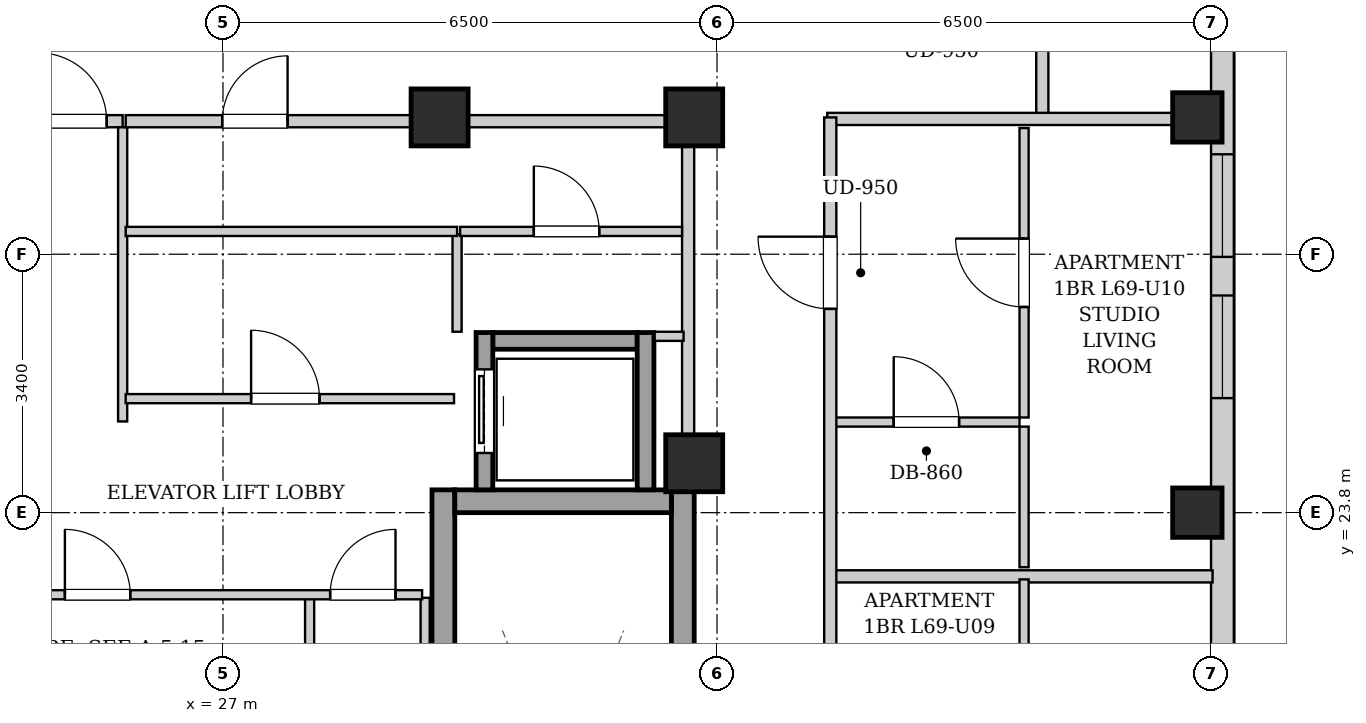
"""IFC4 building model, lengths in metres.
Left out: names, types, materials, properties, quantities, classifications, styles, units other than length and angle.
Written with IfcOpenShell. Run it as: python <this file> out.ifc"""

import sys

from ifc_helpers import new_model, si_unit, direction, frame, frame_2d, origin, origin_2d, place, context, subcontext, project, spatial, rectangle, extrude, element, fill, save


model = new_model("IFC4")
c1 = context("Model", 3, precision=1e-05, world=origin(), true_north=direction((0.0, 1.0)))
c2 = subcontext(c1, "Body", "Model", "MODEL_VIEW")
j1 = project(units=[si_unit("LENGTHUNIT", "METRE"), si_unit("PLANEANGLEUNIT", "RADIAN")], contexts=[c1])
p1 = place(None, origin())
s1 = spatial("IfcSite", under=j1, at=p1, CompositionType="ELEMENT")
p2 = place(p1, origin())
s2 = spatial("IfcBuilding", under=s1, at=p2, CompositionType="ELEMENT")
p3 = place(p2, frame((0.0, 0.0, 237.7)))
s3 = spatial("IfcBuildingStorey", under=s2, at=p3, CompositionType="ELEMENT", Elevation=237.7)
for number, where, z_axis, x_axis in (
    (1, (39.82, 23.8, 0.0), (0.0, 0.0, 1.0), (1.0, 0.0, 0.0)),
    (2, (39.82, 29.0, 0.0), (0.0, 0.0, 1.0), (1.0, 0.0, 0.0)),
):
    element("IfcColumn", number, at=place(p3, frame(where, z_axis=z_axis, x_axis=x_axis)), inside=s3, PredefinedType="COLUMN", context=c2, shape_type="SweptSolid", body=[
        extrude(rectangle(XDim=0.65, YDim=0.65, at=origin_2d()), origin(), (0.0, 0.0, 1.0), 3.4),
    ])
for number, where, z_axis, x_axis in (
    (3, (29.85, 29.0, 0.0), (0.0, 0.0, 1.0), (1.0, 0.0, 0.0)),
    (4, (33.2, 29.0, 0.0), (0.0, 0.0, 1.0), (1.0, 0.0, 0.0)),
    (5, (33.2, 24.45, 0.0), (0.0, 0.0, 1.0), (1.0, 0.0, 0.0)),
):
    element("IfcColumn", number, at=place(p3, frame(where, z_axis=z_axis, x_axis=x_axis)), inside=s3, PredefinedType="COLUMN", context=c2, shape_type="SweptSolid", body=[
        extrude(rectangle(XDim=0.75, YDim=0.75, at=origin_2d()), origin(), (0.0, 0.0, 1.0), 3.4),
    ])
p4 = place(p3, frame((40.15, 37.7, 0.0), z_axis=(0.0, 0.0, 1.0), x_axis=(0.0, -1.0, 0.0)))
e6 = element("IfcWall", 6, at=p4, inside=s3, PredefinedType="SOLIDWALL", context=c2, shape_type="SweptSolid", body=[
    extrude(rectangle(XDim=31.4, YDim=0.3, at=frame_2d((15.7, 0.0))), origin(), (0.0, 0.0, 1.0), 3.14),
])
p5 = place(p4, frame((28.546, 0.0, 0.55)))
e7 = element("IfcOpeningElement", 7, at=p5, cuts=e6, PredefinedType="OPENING", context=c2, shape_type="SweptSolid", body=[
    extrude(rectangle(XDim=1.35, YDim=1.2, at=frame_2d((0.675, 0.6))), frame((0.0, 0.16, 0.0), z_axis=(0.0, -1.0, 0.0), x_axis=(1.0, 0.0, 0.0)), (0.0, 0.0, 1.0), 0.32),
])
p6 = place(p4, frame((1.504, 0.0, 0.55)))
e8 = element("IfcOpeningElement", 8, at=p6, cuts=e6, PredefinedType="OPENING", context=c2, shape_type="SweptSolid", body=[
    extrude(rectangle(XDim=1.35, YDim=1.2, at=frame_2d((0.675, 0.6))), frame((0.0, 0.16, 0.0), z_axis=(0.0, -1.0, 0.0), x_axis=(1.0, 0.0, 0.0)), (0.0, 0.0, 1.0), 0.32),
])
p7 = place(p4, frame((18.2, 0.0, 0.55)))
e9 = element("IfcOpeningElement", 9, at=p7, cuts=e6, PredefinedType="OPENING", context=c2, shape_type="SweptSolid", body=[
    extrude(rectangle(XDim=1.35, YDim=1.2, at=frame_2d((0.675, 0.6))), frame((0.0, 0.16, 0.0), z_axis=(0.0, -1.0, 0.0), x_axis=(1.0, 0.0, 0.0)), (0.0, 0.0, 1.0), 0.32),
])
p8 = place(p4, frame((19.81, 0.0, 0.55)))
e10 = element("IfcOpeningElement", 10, at=p8, cuts=e6, PredefinedType="OPENING", context=c2, shape_type="SweptSolid", body=[
    extrude(rectangle(XDim=1.35, YDim=1.2, at=frame_2d((0.675, 0.6))), frame((0.0, 0.16, 0.0), z_axis=(0.0, -1.0, 0.0), x_axis=(1.0, 0.0, 0.0)), (0.0, 0.0, 1.0), 0.32),
])
p9 = place(p4, frame((11.043, 0.0, 0.55)))
e11 = element("IfcOpeningElement", 11, at=p9, cuts=e6, PredefinedType="OPENING", context=c2, shape_type="SweptSolid", body=[
    extrude(rectangle(XDim=1.35, YDim=1.2, at=frame_2d((0.675, 0.6))), frame((0.0, 0.16, 0.0), z_axis=(0.0, -1.0, 0.0), x_axis=(1.0, 0.0, 0.0)), (0.0, 0.0, 1.0), 0.32),
])
p10 = place(p4, frame((9.185, 0.0, 0.55)))
e12 = element("IfcOpeningElement", 12, at=p10, cuts=e6, PredefinedType="OPENING", context=c2, shape_type="SweptSolid", body=[
    extrude(rectangle(XDim=1.35, YDim=1.2, at=frame_2d((0.675, 0.6))), frame((0.0, 0.16, 0.0), z_axis=(0.0, -1.0, 0.0), x_axis=(1.0, 0.0, 0.0)), (0.0, 0.0, 1.0), 0.32),
])
for number, where, z_axis, x_axis in (
    (13, (29.9, 15.1, 0.0), (0.0, 0.0, 1.0), (0.0, 1.0, 0.0)),
    (14, (33.05, 15.1, 0.0), (0.0, 0.0, 1.0), (0.0, 1.0, 0.0)),
):
    element("IfcWall", number, at=place(p3, frame(where, z_axis=z_axis, x_axis=x_axis)), inside=s3, PredefinedType="SHEAR", context=c2, shape_type="SweptSolid", body=[
        extrude(rectangle(XDim=9.0, YDim=0.3, at=frame_2d((4.5, 0.0))), origin(), (0.0, 0.0, 1.0), 3.14),
    ])
p11 = place(p3, frame((30.05, 23.95, 0.0), z_axis=(0.0, 0.0, 1.0), x_axis=(1.0, 0.0, 0.0)))
e15 = element("IfcWall", 15, at=p11, inside=s3, PredefinedType="SHEAR", context=c2, shape_type="SweptSolid", body=[
    extrude(rectangle(XDim=2.85, YDim=0.3, at=frame_2d((1.425, 0.0))), origin(), (0.0, 0.0, 1.0), 3.14),
])
p12 = place(p3, frame((30.55, 26.06, 0.0), z_axis=(0.0, 0.0, 1.0), x_axis=(1.0, 0.0, 0.0)))
e16 = element("IfcWall", 16, at=p12, inside=s3, PredefinedType="SHEAR", context=c2, shape_type="SweptSolid", body=[
    extrude(rectangle(XDim=1.9, YDim=0.22, at=frame_2d((0.95, 0.0))), origin(), (0.0, 0.0, 1.0), 3.14),
])
p13 = place(p3, frame((30.44, 24.1, 0.0), z_axis=(0.0, 0.0, 1.0), x_axis=(0.0, 1.0, 0.0)))
e17 = element("IfcWall", 17, at=p13, inside=s3, PredefinedType="SHEAR", context=c2, shape_type="SweptSolid", body=[
    extrude(rectangle(XDim=2.07, YDim=0.22, at=frame_2d((1.035, 0.0))), origin(), (0.0, 0.0, 1.0), 3.14),
])
p14 = place(p13, frame((0.485, 0.0, 0.0)))
e18 = element("IfcOpeningElement", 18, at=p14, cuts=e17, PredefinedType="OPENING", context=c2, shape_type="SweptSolid", body=[
    extrude(rectangle(XDim=1.1, YDim=2.15, at=frame_2d((0.55, 1.075))), frame((0.0, 0.12, 0.0), z_axis=(0.0, -1.0, 0.0), x_axis=(1.0, 0.0, 0.0)), (0.0, 0.0, 1.0), 0.24),
])
p15 = place(p3, frame((32.56, 24.1, 0.0), z_axis=(0.0, 0.0, 1.0), x_axis=(0.0, 1.0, 0.0)))
e19 = element("IfcWall", 19, at=p15, inside=s3, PredefinedType="SHEAR", context=c2, shape_type="SweptSolid", body=[
    extrude(rectangle(XDim=2.07, YDim=0.22, at=frame_2d((1.035, 0.0))), origin(), (0.0, 0.0, 1.0), 3.14),
])
p16 = place(p3, frame((33.12, 24.12, 0.0), z_axis=(0.0, 0.0, 1.0), x_axis=(0.0, 1.0, 0.0)))
e20 = element("IfcWall", 20, at=p16, inside=s3, PredefinedType="PARTITIONING", context=c2, shape_type="SweptSolid", body=[
    extrude(rectangle(XDim=4.76, YDim=0.16, at=frame_2d((2.38, 0.0))), origin(), (0.0, 0.0, 1.0), 2.475),
])
p17 = place(p3, frame((24.36, 28.95, 0.0), z_axis=(0.0, 0.0, 1.0), x_axis=(1.0, 0.0, 0.0)))
e21 = element("IfcWall", 21, at=p17, inside=s3, PredefinedType="PARTITIONING", context=c2, shape_type="SweptSolid", body=[
    extrude(rectangle(XDim=1.32, YDim=0.16, at=frame_2d((0.66, 0.0))), origin(), (0.0, 0.0, 1.0), 2.668),
])
p18 = place(p17, frame((0.21, 0.0, 0.0)))
e22 = element("IfcOpeningElement", 22, at=p18, cuts=e21, PredefinedType="OPENING", context=c2, shape_type="SweptSolid", body=[
    extrude(rectangle(XDim=0.9, YDim=2.05, at=frame_2d((0.45, 1.025))), frame((0.0, 0.09, 0.0), z_axis=(0.0, -1.0, 0.0), x_axis=(1.0, 0.0, 0.0)), (0.0, 0.0, 1.0), 0.18),
])
p19 = place(p3, frame((25.68, 25.0, 0.0), z_axis=(0.0, 0.0, 1.0), x_axis=(0.0, 1.0, 0.0)))
e23 = element("IfcWall", 23, at=p19, inside=s3, PredefinedType="PARTITIONING", context=c2, shape_type="SweptSolid", body=[
    extrude(rectangle(XDim=3.87, YDim=0.12, at=frame_2d((1.935, 0.0))), origin(), (0.0, 0.0, 1.0), 3.14),
])
p20 = place(p3, frame((30.08, 26.18, 0.0), z_axis=(0.0, 0.0, 1.0), x_axis=(0.0, 1.0, 0.0)))
e24 = element("IfcWall", 24, at=p20, inside=s3, PredefinedType="PARTITIONING", context=c2, shape_type="SweptSolid", body=[
    extrude(rectangle(XDim=1.28, YDim=0.12, at=frame_2d((0.64, 0.0))), origin(), (0.0, 0.0, 1.0), 3.14),
])
p21 = place(p3, frame((32.68, 26.12, 0.0), z_axis=(0.0, 0.0, 1.0), x_axis=(1.0, 0.0, 0.0)))
e25 = element("IfcWall", 25, at=p21, inside=s3, PredefinedType="PARTITIONING", context=c2, shape_type="SweptSolid", body=[
    extrude(rectangle(XDim=0.38, YDim=0.12, at=frame_2d((0.19, 0.0))), origin(), (0.0, 0.0, 1.0), 3.14),
])
p22 = place(p3, frame((30.12, 27.5, 0.0), z_axis=(0.0, 0.0, 1.0), x_axis=(1.0, 0.0, 0.0)))
e26 = element("IfcWall", 26, at=p22, inside=s3, PredefinedType="PARTITIONING", context=c2, shape_type="SweptSolid", body=[
    extrude(rectangle(XDim=2.92, YDim=0.12, at=frame_2d((1.46, 0.0))), origin(), (0.0, 0.0, 1.0), 3.14),
])
p23 = place(p22, frame((0.97, 0.0, 0.0)))
e27 = element("IfcOpeningElement", 27, at=p23, cuts=e26, PredefinedType="OPENING", context=c2, shape_type="SweptSolid", body=[
    extrude(rectangle(XDim=0.86, YDim=2.05, at=frame_2d((0.43, 1.025))), frame((0.0, 0.07, 0.0), z_axis=(0.0, -1.0, 0.0), x_axis=(1.0, 0.0, 0.0)), (0.0, 0.0, 1.0), 0.14),
])
p24 = place(p3, frame((25.72, 27.5, 0.0), z_axis=(0.0, 0.0, 1.0), x_axis=(1.0, 0.0, 0.0)))
e28 = element("IfcWall", 28, at=p24, inside=s3, PredefinedType="PARTITIONING", context=c2, shape_type="SweptSolid", body=[
    extrude(rectangle(XDim=4.36, YDim=0.12, at=frame_2d((2.18, 0.0))), origin(), (0.0, 0.0, 1.0), 3.14),
])
p25 = place(p3, frame((25.72, 25.3, 0.0), z_axis=(0.0, 0.0, 1.0), x_axis=(1.0, 0.0, 0.0)))
e29 = element("IfcWall", 29, at=p25, inside=s3, PredefinedType="PARTITIONING", context=c2, shape_type="SweptSolid", body=[
    extrude(rectangle(XDim=4.32, YDim=0.12, at=frame_2d((2.16, 0.0))), origin(), (0.0, 0.0, 1.0), 3.14),
])
p26 = place(p25, frame((1.65, 0.0, 0.0)))
e30 = element("IfcOpeningElement", 30, at=p26, cuts=e29, PredefinedType="OPENING", context=c2, shape_type="SweptSolid", body=[
    extrude(rectangle(XDim=0.9, YDim=2.05, at=frame_2d((0.45, 1.025))), frame((0.0, 0.07, 0.0), z_axis=(0.0, -1.0, 0.0), x_axis=(1.0, 0.0, 0.0)), (0.0, 0.0, 1.0), 0.14),
])
p27 = place(p3, frame((25.72, 28.95, 0.0), z_axis=(0.0, 0.0, 1.0), x_axis=(1.0, 0.0, 0.0)))
e31 = element("IfcWall", 31, at=p27, inside=s3, PredefinedType="PARTITIONING", context=c2, shape_type="SweptSolid", body=[
    extrude(rectangle(XDim=7.32, YDim=0.16, at=frame_2d((3.66, 0.0))), origin(), (0.0, 0.0, 1.0), 2.668),
])
p28 = place(p27, frame((1.27, 0.0, 0.0)))
e32 = element("IfcOpeningElement", 32, at=p28, cuts=e31, PredefinedType="OPENING", context=c2, shape_type="SweptSolid", body=[
    extrude(rectangle(XDim=0.86, YDim=2.05, at=frame_2d((0.43, 1.025))), frame((0.0, 0.09, 0.0), z_axis=(0.0, -1.0, 0.0), x_axis=(1.0, 0.0, 0.0)), (0.0, 0.0, 1.0), 0.18),
])
p29 = place(p3, frame((29.66, 20.62, 0.0), z_axis=(0.0, 0.0, 1.0), x_axis=(0.0, 1.0, 0.0)))
e33 = element("IfcWall", 33, at=p29, inside=s3, PredefinedType="PARTITIONING", context=c2, shape_type="SweptSolid", body=[
    extrude(rectangle(XDim=2.06, YDim=0.12, at=frame_2d((1.03, 0.0))), origin(), (0.0, 0.0, 1.0), 3.14),
])
p30 = place(p3, frame((28.14, 21.65, 0.0), z_axis=(0.0, 0.0, 1.0), x_axis=(0.0, 1.0, 0.0)))
e34 = element("IfcWall", 34, at=p30, inside=s3, PredefinedType="PARTITIONING", context=c2, shape_type="SweptSolid", body=[
    extrude(rectangle(XDim=1.03, YDim=0.12, at=frame_2d((0.515, 0.0))), origin(), (0.0, 0.0, 1.0), 3.14),
])
p31 = place(p3, frame((22.35, 22.72, 0.0), z_axis=(0.0, 0.0, 1.0), x_axis=(1.0, 0.0, 0.0)))
e35 = element("IfcWall", 35, at=p31, inside=s3, PredefinedType="PARTITIONING", context=c2, shape_type="SweptSolid", body=[
    extrude(rectangle(XDim=7.27, YDim=0.12, at=frame_2d((3.635, 0.0))), origin(), (0.0, 0.0, 1.0), 3.14),
])
p32 = place(p31, frame((2.57, 0.0, 0.0)))
e36 = element("IfcOpeningElement", 36, at=p32, cuts=e35, PredefinedType="OPENING", context=c2, shape_type="SweptSolid", body=[
    extrude(rectangle(XDim=0.86, YDim=2.05, at=frame_2d((0.43, 1.025))), frame((0.0, 0.07, 0.0), z_axis=(0.0, -1.0, 0.0), x_axis=(1.0, 0.0, 0.0)), (0.0, 0.0, 1.0), 0.14),
])
p33 = place(p31, frame((6.06, 0.0, 0.0)))
e37 = element("IfcOpeningElement", 37, at=p33, cuts=e35, PredefinedType="OPENING", context=c2, shape_type="SweptSolid", body=[
    extrude(rectangle(XDim=0.86, YDim=2.05, at=frame_2d((0.43, 1.025))), frame((0.0, 0.07, 0.0), z_axis=(0.0, -1.0, 0.0), x_axis=(1.0, 0.0, 0.0)), (0.0, 0.0, 1.0), 0.14),
])
p34 = place(p3, frame((37.78, 28.98, 0.0), z_axis=(0.0, 0.0, 1.0), x_axis=(0.0, 1.0, 0.0)))
e38 = element("IfcWall", 38, at=p34, inside=s3, PredefinedType="PARTITIONING", context=c2, shape_type="SweptSolid", body=[
    extrude(rectangle(XDim=1.58, YDim=0.16, at=frame_2d((0.79, 0.0))), origin(), (0.0, 0.0, 1.0), 3.14),
])
p35 = place(p3, frame((34.95, 28.98, 0.0), z_axis=(0.0, 0.0, 1.0), x_axis=(1.0, 0.0, 0.0)))
e39 = element("IfcWall", 39, at=p35, inside=s3, PredefinedType="PARTITIONING", context=c2, shape_type="SweptSolid", body=[
    extrude(rectangle(XDim=5.07, YDim=0.16, at=frame_2d((2.535, 0.0))), origin(), (0.0, 0.0, 1.0), 2.668),
])
p36 = place(p3, frame((35.03, 22.962, 0.0), z_axis=(0.0, 0.0, 1.0), x_axis=(1.0, 0.0, 0.0)))
e40 = element("IfcWall", 40, at=p36, inside=s3, PredefinedType="PARTITIONING", context=c2, shape_type="SweptSolid", body=[
    extrude(rectangle(XDim=4.99, YDim=0.16, at=frame_2d((2.495, 0.0))), origin(), (0.0, 0.0, 1.0), 3.14),
])
p37 = place(p3, frame((37.54, 17.489, 0.0), z_axis=(0.0, 0.0, 1.0), x_axis=(0.0, 1.0, 0.0)))
e41 = element("IfcWall", 41, at=p37, inside=s3, PredefinedType="PARTITIONING", context=c2, shape_type="SweptSolid", body=[
    extrude(rectangle(XDim=5.433, YDim=0.12, at=frame_2d((2.717, 0.0))), origin(), (0.0, 0.0, 1.0), 3.14),
])
p38 = place(p37, frame((2.266, 0.0, 0.0)))
e42 = element("IfcOpeningElement", 42, at=p38, cuts=e41, PredefinedType="OPENING", context=c2, shape_type="SweptSolid", body=[
    extrude(rectangle(XDim=0.9, YDim=2.05, at=frame_2d((0.45, 1.025))), frame((0.0, 0.07, 0.0), z_axis=(0.0, -1.0, 0.0), x_axis=(1.0, 0.0, 0.0)), (0.0, 0.0, 1.0), 0.14),
])
p39 = place(p3, frame((35.03, 24.992, 0.0), z_axis=(0.0, 0.0, 1.0), x_axis=(1.0, 0.0, 0.0)))
e43 = element("IfcWall", 43, at=p39, inside=s3, PredefinedType="PARTITIONING", context=c2, shape_type="SweptSolid", body=[
    extrude(rectangle(XDim=2.45, YDim=0.12, at=frame_2d((1.225, 0.0))), origin(), (0.0, 0.0, 1.0), 3.14),
])
p40 = place(p39, frame((0.795, 0.0, 0.0)))
e44 = element("IfcOpeningElement", 44, at=p40, cuts=e43, PredefinedType="OPENING", context=c2, shape_type="SweptSolid", body=[
    extrude(rectangle(XDim=0.86, YDim=2.05, at=frame_2d((0.43, 1.025))), frame((0.0, 0.07, 0.0), z_axis=(0.0, -1.0, 0.0), x_axis=(1.0, 0.0, 0.0)), (0.0, 0.0, 1.0), 0.14),
])
p41 = place(p3, frame((37.54, 23.082, 0.0), z_axis=(0.0, 0.0, 1.0), x_axis=(0.0, 1.0, 0.0)))
e45 = element("IfcWall", 45, at=p41, inside=s3, PredefinedType="PARTITIONING", context=c2, shape_type="SweptSolid", body=[
    extrude(rectangle(XDim=1.85, YDim=0.12, at=frame_2d((0.925, 0.0))), origin(), (0.0, 0.0, 1.0), 3.14),
])
p42 = place(p3, frame((37.54, 25.052, 0.0), z_axis=(0.0, 0.0, 1.0), x_axis=(0.0, 1.0, 0.0)))
e46 = element("IfcWall", 46, at=p42, inside=s3, PredefinedType="PARTITIONING", context=c2, shape_type="SweptSolid", body=[
    extrude(rectangle(XDim=3.808, YDim=0.12, at=frame_2d((1.904, 0.0))), origin(), (0.0, 0.0, 1.0), 3.14),
])
p43 = place(p42, frame((1.454, 0.0, 0.0)))
e47 = element("IfcOpeningElement", 47, at=p43, cuts=e46, PredefinedType="OPENING", context=c2, shape_type="SweptSolid", body=[
    extrude(rectangle(XDim=0.9, YDim=2.05, at=frame_2d((0.45, 1.025))), frame((0.0, 0.07, 0.0), z_axis=(0.0, -1.0, 0.0), x_axis=(1.0, 0.0, 0.0)), (0.0, 0.0, 1.0), 0.14),
])
p44 = place(p3, frame((34.99, 15.07, 0.0), z_axis=(0.0, 0.0, 1.0), x_axis=(0.0, 1.0, 0.0)))
e48 = element("IfcWall", 48, at=p44, inside=s3, PredefinedType="PARTITIONING", context=c2, shape_type="SweptSolid", body=[
    extrude(rectangle(XDim=13.93, YDim=0.16, at=frame_2d((6.965, 0.0))), origin(), (0.0, 0.0, 1.0), 3.14),
])
p45 = place(p44, frame((4.661, 0.0, 0.0)))
e49 = element("IfcOpeningElement", 49, at=p45, cuts=e48, PredefinedType="OPENING", context=c2, shape_type="SweptSolid", body=[
    extrude(rectangle(XDim=0.95, YDim=2.1, at=frame_2d((0.475, 1.05))), frame((0.0, 0.09, 0.0), z_axis=(0.0, -1.0, 0.0), x_axis=(1.0, 0.0, 0.0)), (0.0, 0.0, 1.0), 0.18),
])
p46 = place(p44, frame((11.411, 0.0, 0.0)))
e50 = element("IfcOpeningElement", 50, at=p46, cuts=e48, PredefinedType="OPENING", context=c2, shape_type="SweptSolid", body=[
    extrude(rectangle(XDim=0.95, YDim=2.1, at=frame_2d((0.475, 1.05))), frame((0.0, 0.09, 0.0), z_axis=(0.0, -1.0, 0.0), x_axis=(1.0, 0.0, 0.0)), (0.0, 0.0, 1.0), 0.18),
])
p47 = place(p14, origin())
e51 = element("IfcDoor", 51, at=p47, inside=s3, OperationType="SLIDING_TO_LEFT", PredefinedType="DOOR", context=c2, shape_type="SweptSolid", body=[
    extrude(rectangle(XDim=1.1, YDim=2.15, at=frame_2d((0.55, 1.075))), frame((0.0, 0.025, 0.0), z_axis=(0.0, -1.0, 0.0), x_axis=(1.0, 0.0, 0.0)), (0.0, 0.0, 1.0), 0.05),
])
fill(e18, e51)
p48 = place(p18, origin())
e52 = element("IfcDoor", 52, at=p48, inside=s3, OperationType="SINGLE_SWING_LEFT", PredefinedType="DOOR", context=c2, shape_type="SweptSolid", body=[
    extrude(rectangle(XDim=0.9, YDim=2.05, at=frame_2d((0.45, 1.025))), frame((0.0, 0.025, 0.0), z_axis=(0.0, -1.0, 0.0), x_axis=(1.0, 0.0, 0.0)), (0.0, 0.0, 1.0), 0.05),
])
fill(e22, e52)
p49 = place(p23, origin())
e53 = element("IfcDoor", 53, at=p49, inside=s3, OperationType="SINGLE_SWING_LEFT", PredefinedType="DOOR", context=c2, shape_type="SweptSolid", body=[
    extrude(rectangle(XDim=0.86, YDim=2.05, at=frame_2d((0.43, 1.025))), frame((0.0, 0.025, 0.0), z_axis=(0.0, -1.0, 0.0), x_axis=(1.0, 0.0, 0.0)), (0.0, 0.0, 1.0), 0.05),
])
fill(e27, e53)
p50 = place(p26, origin())
e54 = element("IfcDoor", 54, at=p50, inside=s3, OperationType="SINGLE_SWING_LEFT", PredefinedType="DOOR", context=c2, shape_type="SweptSolid", body=[
    extrude(rectangle(XDim=0.9, YDim=2.05, at=frame_2d((0.45, 1.025))), frame((0.0, 0.025, 0.0), z_axis=(0.0, -1.0, 0.0), x_axis=(1.0, 0.0, 0.0)), (0.0, 0.0, 1.0), 0.05),
])
fill(e30, e54)
p51 = place(p28, origin())
e55 = element("IfcDoor", 55, at=p51, inside=s3, OperationType="SINGLE_SWING_RIGHT", PredefinedType="DOOR", context=c2, shape_type="SweptSolid", body=[
    extrude(rectangle(XDim=0.86, YDim=2.05, at=frame_2d((0.43, 1.025))), frame((0.0, 0.025, 0.0), z_axis=(0.0, -1.0, 0.0), x_axis=(1.0, 0.0, 0.0)), (0.0, 0.0, 1.0), 0.05),
])
fill(e32, e55)
p52 = place(p32, origin())
e56 = element("IfcDoor", 56, at=p52, inside=s3, OperationType="SINGLE_SWING_LEFT", PredefinedType="DOOR", context=c2, shape_type="SweptSolid", body=[
    extrude(rectangle(XDim=0.86, YDim=2.05, at=frame_2d((0.43, 1.025))), frame((0.0, 0.025, 0.0), z_axis=(0.0, -1.0, 0.0), x_axis=(1.0, 0.0, 0.0)), (0.0, 0.0, 1.0), 0.05),
])
fill(e36, e56)
p53 = place(p33, origin())
e57 = element("IfcDoor", 57, at=p53, inside=s3, OperationType="SINGLE_SWING_RIGHT", PredefinedType="DOOR", context=c2, shape_type="SweptSolid", body=[
    extrude(rectangle(XDim=0.86, YDim=2.05, at=frame_2d((0.43, 1.025))), frame((0.0, 0.025, 0.0), z_axis=(0.0, -1.0, 0.0), x_axis=(1.0, 0.0, 0.0)), (0.0, 0.0, 1.0), 0.05),
])
fill(e37, e57)
p54 = place(p40, origin())
e58 = element("IfcDoor", 58, at=p54, inside=s3, OperationType="SINGLE_SWING_LEFT", PredefinedType="DOOR", context=c2, shape_type="SweptSolid", body=[
    extrude(rectangle(XDim=0.86, YDim=2.05, at=frame_2d((0.43, 1.025))), frame((0.0, 0.025, 0.0), z_axis=(0.0, -1.0, 0.0), x_axis=(1.0, 0.0, 0.0)), (0.0, 0.0, 1.0), 0.05),
])
fill(e44, e58)
p55 = place(p43, origin())
e59 = element("IfcDoor", 59, at=p55, inside=s3, OperationType="SINGLE_SWING_RIGHT", PredefinedType="DOOR", context=c2, shape_type="SweptSolid", body=[
    extrude(rectangle(XDim=0.9, YDim=2.05, at=frame_2d((0.45, 1.025))), frame((0.0, 0.025, 0.0), z_axis=(0.0, -1.0, 0.0), x_axis=(1.0, 0.0, 0.0)), (0.0, 0.0, 1.0), 0.05),
])
fill(e47, e59)
p56 = place(p46, origin())
e60 = element("IfcDoor", 60, at=p56, inside=s3, OperationType="SINGLE_SWING_RIGHT", PredefinedType="DOOR", context=c2, shape_type="SweptSolid", body=[
    extrude(rectangle(XDim=0.95, YDim=2.1, at=frame_2d((0.475, 1.05))), frame((0.0, 0.025, 0.0), z_axis=(0.0, -1.0, 0.0), x_axis=(1.0, 0.0, 0.0)), (0.0, 0.0, 1.0), 0.05),
])
fill(e50, e60)
p57 = place(p9, origin())
e61 = element("IfcWindow", 61, at=p57, inside=s3, PartitioningType="SINGLE_PANEL", PredefinedType="WINDOW", context=c2, shape_type="SweptSolid", body=[
    extrude(rectangle(XDim=1.35, YDim=1.2, at=frame_2d((0.675, 0.6))), frame((0.0, 0.03, 0.0), z_axis=(0.0, -1.0, 0.0), x_axis=(1.0, 0.0, 0.0)), (0.0, 0.0, 1.0), 0.06),
])
fill(e11, e61)
p58 = place(p10, origin())
e62 = element("IfcWindow", 62, at=p58, inside=s3, PartitioningType="SINGLE_PANEL", PredefinedType="WINDOW", context=c2, shape_type="SweptSolid", body=[
    extrude(rectangle(XDim=1.35, YDim=1.2, at=frame_2d((0.675, 0.6))), frame((0.0, 0.03, 0.0), z_axis=(0.0, -1.0, 0.0), x_axis=(1.0, 0.0, 0.0)), (0.0, 0.0, 1.0), 0.06),
])
fill(e12, e62)
save(model, sys.argv[1])
